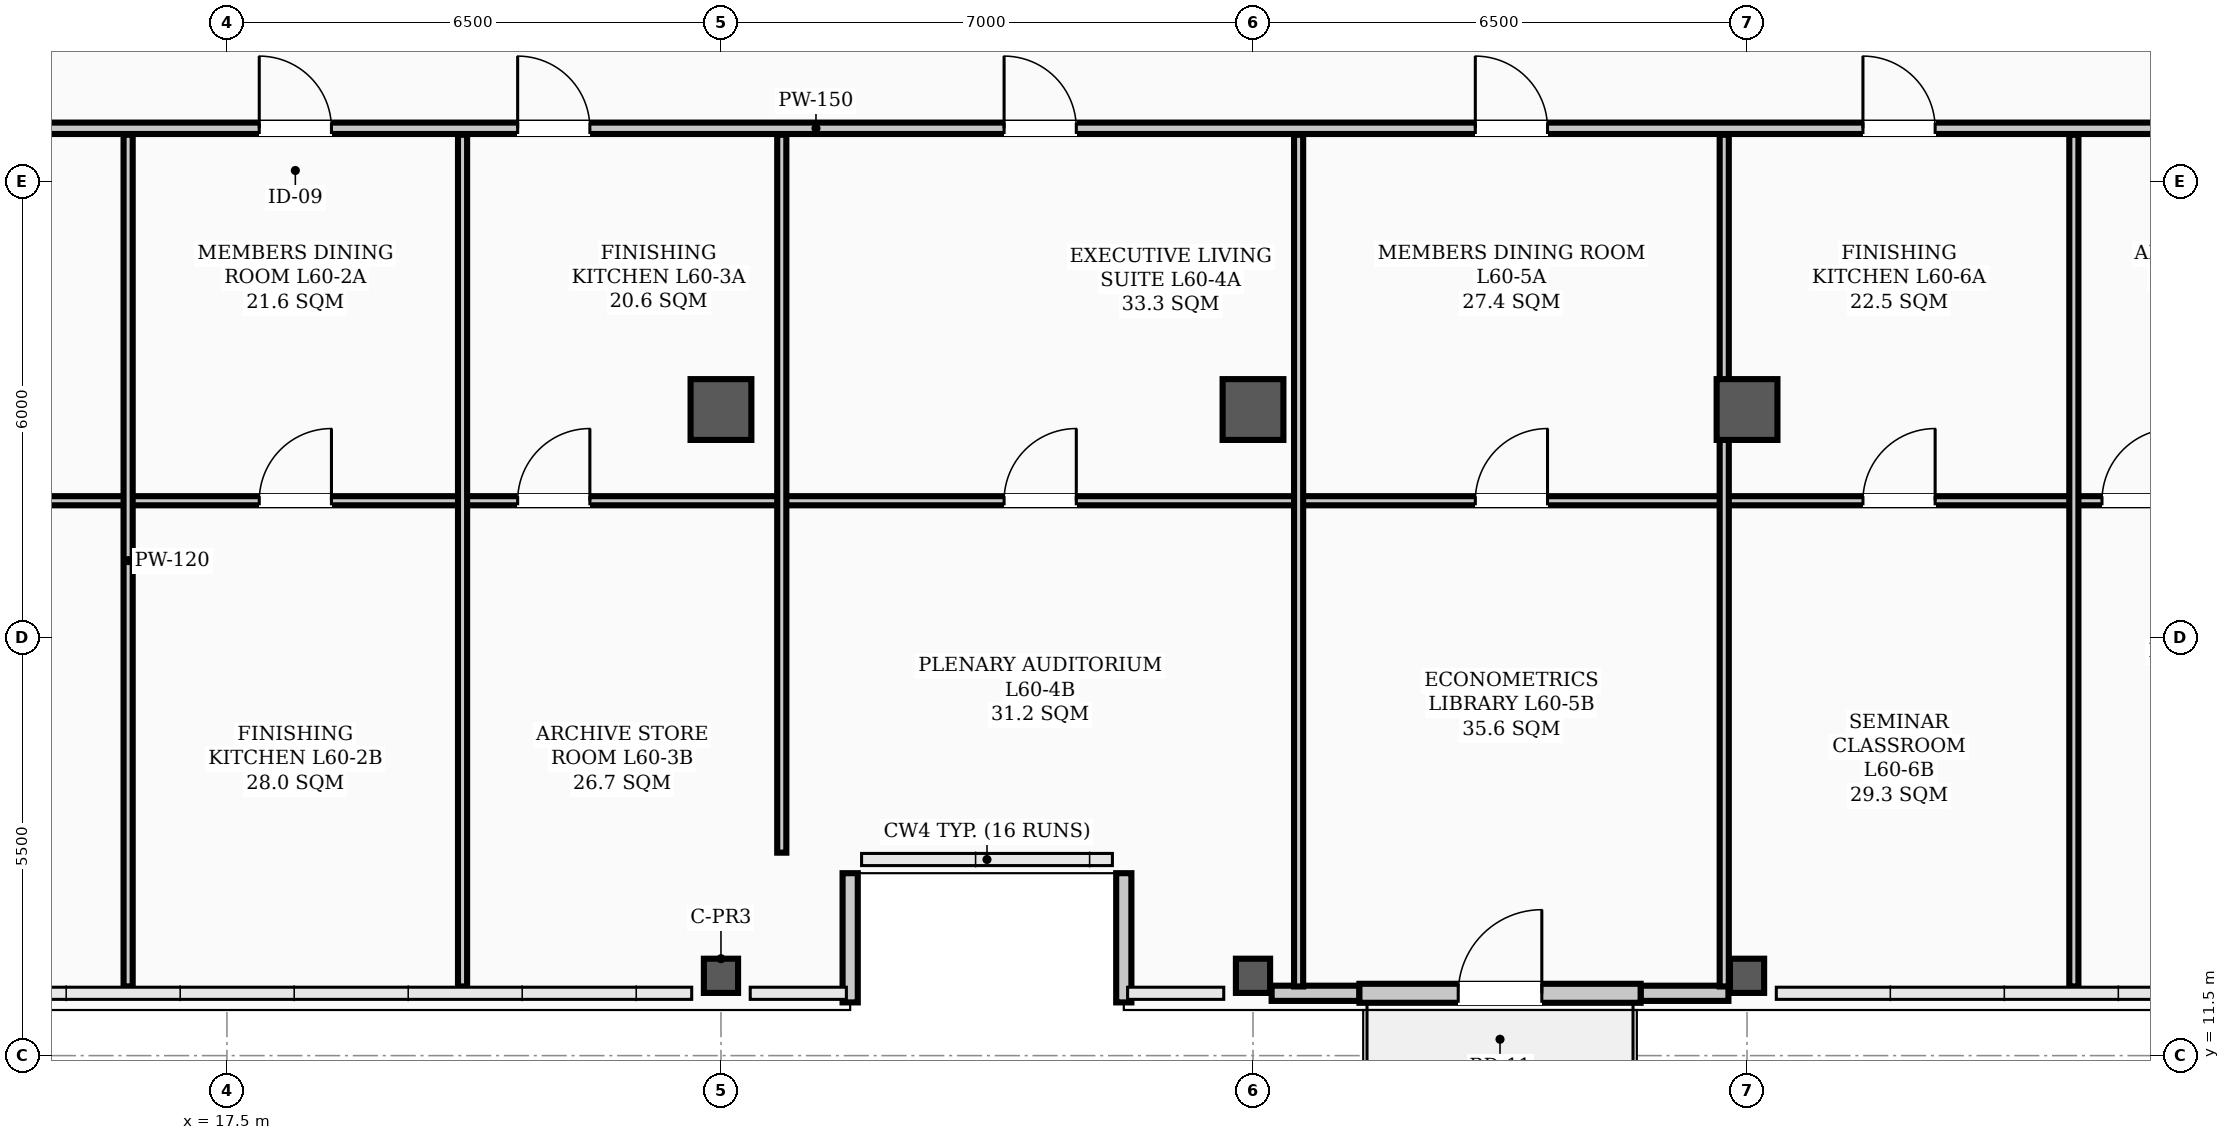
"""IFC4 building model, lengths in metres.
Left out: names, types, materials, properties, quantities, classifications, styles, units other than length and angle.
Written with IfcOpenShell. Run it as: python <this file> out.ifc"""

import sys

from ifc_helpers import new_model, si_unit, direction, frame, frame_2d, origin, origin_2d, place, context, subcontext, project, spatial, rectangle, hollow_rectangle, extrude, element, fill, save


model = new_model("IFC4")
c1 = context("Model", 3, precision=1e-05, world=origin(), true_north=direction((0.0, 1.0)))
c2 = subcontext(c1, "Body", "Model", "MODEL_VIEW")
j1 = project(units=[si_unit("LENGTHUNIT", "METRE"), si_unit("PLANEANGLEUNIT", "RADIAN")], contexts=[c1])
p1 = place(None, origin())
s1 = spatial("IfcSite", under=j1, at=p1, CompositionType="ELEMENT")
p2 = place(p1, origin())
s2 = spatial("IfcBuilding", under=s1, at=p2, CompositionType="ELEMENT")
p3 = place(p2, frame((0.0, 0.0, 242.3)))
s3 = spatial("IfcBuildingStorey", under=s2, at=p3, CompositionType="ELEMENT", Elevation=242.3)
for number, where, z_axis, x_axis in (
    (1, (24.0, 20.0, 0.0), (0.0, 0.0, 1.0), (1.0, 0.0, 0.0)),
    (2, (31.0, 20.0, 0.0), (0.0, 0.0, 1.0), (1.0, 0.0, 0.0)),
    (3, (37.5, 20.0, 0.0), (0.0, 0.0, 1.0), (1.0, 0.0, 0.0)),
):
    element("IfcColumn", number, at=place(p3, frame(where, z_axis=z_axis, x_axis=x_axis)), inside=s3, PredefinedType="COLUMN", context=c2, shape_type="SweptSolid", body=[
        extrude(hollow_rectangle(XDim=0.8, YDim=0.8, WallThickness=0.032, InnerFilletRadius=0.016, OuterFilletRadius=0.048, at=origin_2d()), origin(), (0.0, 0.0, 1.0), 3.9),
    ])
for number, where, z_axis, x_axis in (
    (4, (24.0, 12.55, 0.0), (0.0, 0.0, 1.0), (1.0, 0.0, 0.0)),
    (5, (31.0, 12.55, 0.0), (0.0, 0.0, 1.0), (1.0, 0.0, 0.0)),
    (6, (37.5, 12.55, 0.0), (0.0, 0.0, 1.0), (1.0, 0.0, 0.0)),
):
    element("IfcColumn", number, at=place(p3, frame(where, z_axis=z_axis, x_axis=x_axis)), inside=s3, PredefinedType="COLUMN", context=c2, shape_type="SweptSolid", body=[
        extrude(hollow_rectangle(XDim=0.45, YDim=0.45, WallThickness=0.022, InnerFilletRadius=0.022, OuterFilletRadius=0.044, at=origin_2d()), origin(), (0.0, 0.0, 1.0), 3.9),
    ])
for number, where, z_axis, x_axis in (
    (7, (31.245, 12.32, 0.0), (0.0, 0.0, 1.0), (1.0, 0.0, 0.0)),
    (8, (36.1, 12.32, 0.0), (0.0, 0.0, 1.0), (1.0, 0.0, 0.0)),
):
    element("IfcWall", number, at=place(p3, frame(where, z_axis=z_axis, x_axis=x_axis)), inside=s3, PredefinedType="PARAPET", context=c2, shape_type="SweptSolid", body=[
        extrude(rectangle(XDim=1.155, YDim=0.2, at=frame_2d((0.577, 0.0))), origin(), (0.0, 0.0, 1.0), 1.2),
    ])
for number, where, z_axis, x_axis in (
    (9, (25.7, 12.2, 0.0), (0.0, 0.0, 1.0), (0.0, 1.0, 0.0)),
    (10, (29.3, 13.9, 0.0), (0.0, 0.0, 1.0), (0.0, -1.0, 0.0)),
):
    element("IfcWall", number, at=place(p3, frame(where, z_axis=z_axis, x_axis=x_axis)), inside=s3, PredefinedType="PARAPET", context=c2, shape_type="SweptSolid", body=[
        extrude(rectangle(XDim=1.7, YDim=0.2, at=frame_2d((0.85, 0.0))), origin(), (0.0, 0.0, 1.0), 1.2),
    ])
p4 = place(p3, frame((32.4, 12.32, 0.0), z_axis=(0.0, 0.0, 1.0), x_axis=(1.0, 0.0, 0.0)))
e11 = element("IfcWall", 11, at=p4, inside=s3, PredefinedType="STANDARD", context=c2, shape_type="SweptSolid", body=[
    extrude(rectangle(XDim=3.7, YDim=0.25, at=frame_2d((1.85, 0.0))), origin(), (0.0, 0.0, 1.0), 3.18),
])
p5 = place(p4, frame((1.3, 0.0, 0.0)))
e12 = element("IfcOpeningElement", 12, at=p5, cuts=e11, PredefinedType="OPENING", context=c2, shape_type="SweptSolid", body=[
    extrude(rectangle(XDim=1.1, YDim=2.2, at=frame_2d((0.55, 1.1))), frame((0.0, 0.135, 0.0), z_axis=(0.0, -1.0, 0.0), x_axis=(1.0, 0.0, 0.0)), (0.0, 0.0, 1.0), 0.27),
])
p6 = place(p3, frame((4.81, 23.7, 0.0), z_axis=(0.0, 0.0, 1.0), x_axis=(1.0, 0.0, 0.0)))
e13 = element("IfcWall", 13, at=p6, inside=s3, PredefinedType="PARTITIONING", context=c2, shape_type="SweptSolid", body=[
    extrude(rectangle(XDim=40.88, YDim=0.15, at=frame_2d((20.44, 0.0))), origin(), (0.0, 0.0, 1.0), 3.2),
])
p7 = place(p6, frame((5.865, 0.0, 0.0)))
e14 = element("IfcOpeningElement", 14, at=p7, cuts=e13, PredefinedType="OPENING", context=c2, shape_type="SweptSolid", body=[
    extrude(rectangle(XDim=0.95, YDim=2.08, at=frame_2d((0.475, 1.04))), frame((0.0, 0.085, 0.0), z_axis=(0.0, -1.0, 0.0), x_axis=(1.0, 0.0, 0.0)), (0.0, 0.0, 1.0), 0.17),
])
p8 = place(p6, frame((13.115, 0.0, 0.0)))
e15 = element("IfcOpeningElement", 15, at=p8, cuts=e13, PredefinedType="OPENING", context=c2, shape_type="SweptSolid", body=[
    extrude(rectangle(XDim=0.95, YDim=2.08, at=frame_2d((0.475, 1.04))), frame((0.0, 0.085, 0.0), z_axis=(0.0, -1.0, 0.0), x_axis=(1.0, 0.0, 0.0)), (0.0, 0.0, 1.0), 0.17),
])
p9 = place(p6, frame((16.515, 0.0, 0.0)))
e16 = element("IfcOpeningElement", 16, at=p9, cuts=e13, PredefinedType="OPENING", context=c2, shape_type="SweptSolid", body=[
    extrude(rectangle(XDim=0.95, YDim=2.08, at=frame_2d((0.475, 1.04))), frame((0.0, 0.085, 0.0), z_axis=(0.0, -1.0, 0.0), x_axis=(1.0, 0.0, 0.0)), (0.0, 0.0, 1.0), 0.17),
])
p10 = place(p6, frame((22.915, 0.0, 0.0)))
e17 = element("IfcOpeningElement", 17, at=p10, cuts=e13, PredefinedType="OPENING", context=c2, shape_type="SweptSolid", body=[
    extrude(rectangle(XDim=0.95, YDim=2.08, at=frame_2d((0.475, 1.04))), frame((0.0, 0.085, 0.0), z_axis=(0.0, -1.0, 0.0), x_axis=(1.0, 0.0, 0.0)), (0.0, 0.0, 1.0), 0.17),
])
p11 = place(p6, frame((29.115, 0.0, 0.0)))
e18 = element("IfcOpeningElement", 18, at=p11, cuts=e13, PredefinedType="OPENING", context=c2, shape_type="SweptSolid", body=[
    extrude(rectangle(XDim=0.95, YDim=2.08, at=frame_2d((0.475, 1.04))), frame((0.0, 0.085, 0.0), z_axis=(0.0, -1.0, 0.0), x_axis=(1.0, 0.0, 0.0)), (0.0, 0.0, 1.0), 0.17),
])
p12 = place(p6, frame((34.215, 0.0, 0.0)))
e19 = element("IfcOpeningElement", 19, at=p12, cuts=e13, PredefinedType="OPENING", context=c2, shape_type="SweptSolid", body=[
    extrude(rectangle(XDim=0.95, YDim=2.08, at=frame_2d((0.475, 1.04))), frame((0.0, 0.085, 0.0), z_axis=(0.0, -1.0, 0.0), x_axis=(1.0, 0.0, 0.0)), (0.0, 0.0, 1.0), 0.17),
])
p13 = place(p6, frame((38.46, 0.0, 0.0)))
e20 = element("IfcOpeningElement", 20, at=p13, cuts=e13, PredefinedType="OPENING", context=c2, shape_type="SweptSolid", body=[
    extrude(rectangle(XDim=0.95, YDim=2.08, at=frame_2d((0.475, 1.04))), frame((0.0, 0.085, 0.0), z_axis=(0.0, -1.0, 0.0), x_axis=(1.0, 0.0, 0.0)), (0.0, 0.0, 1.0), 0.17),
])
p14 = place(p3, frame((4.81, 18.8, 0.0), z_axis=(0.0, 0.0, 1.0), x_axis=(1.0, 0.0, 0.0)))
e21 = element("IfcWall", 21, at=p14, inside=s3, PredefinedType="PARTITIONING", context=c2, shape_type="SweptSolid", body=[
    extrude(rectangle(XDim=11.39, YDim=0.12, at=frame_2d((5.695, 0.0))), origin(), (0.0, 0.0, 1.0), 3.2),
])
p15 = place(p14, frame((5.22, 0.0, 0.0)))
e22 = element("IfcOpeningElement", 22, at=p15, cuts=e21, PredefinedType="OPENING", context=c2, shape_type="SweptSolid", body=[
    extrude(rectangle(XDim=0.95, YDim=2.08, at=frame_2d((0.475, 1.04))), frame((0.0, 0.07, 0.0), z_axis=(0.0, -1.0, 0.0), x_axis=(1.0, 0.0, 0.0)), (0.0, 0.0, 1.0), 0.14),
])
p16 = place(p3, frame((16.2, 18.8, 0.0), z_axis=(0.0, 0.0, 1.0), x_axis=(1.0, 0.0, 0.0)))
e23 = element("IfcWall", 23, at=p16, inside=s3, PredefinedType="PARTITIONING", context=c2, shape_type="SweptSolid", body=[
    extrude(rectangle(XDim=4.4, YDim=0.12, at=frame_2d((2.2, 0.0))), origin(), (0.0, 0.0, 1.0), 3.35),
])
p17 = place(p16, frame((1.725, 0.0, 0.0)))
e24 = element("IfcOpeningElement", 24, at=p17, cuts=e23, PredefinedType="OPENING", context=c2, shape_type="SweptSolid", body=[
    extrude(rectangle(XDim=0.95, YDim=2.08, at=frame_2d((0.475, 1.04))), frame((0.0, 0.07, 0.0), z_axis=(0.0, -1.0, 0.0), x_axis=(1.0, 0.0, 0.0)), (0.0, 0.0, 1.0), 0.14),
])
p18 = place(p3, frame((20.6, 18.8, 0.0), z_axis=(0.0, 0.0, 1.0), x_axis=(1.0, 0.0, 0.0)))
e25 = element("IfcWall", 25, at=p18, inside=s3, PredefinedType="PARTITIONING", context=c2, shape_type="SweptSolid", body=[
    extrude(rectangle(XDim=4.2, YDim=0.12, at=frame_2d((2.1, 0.0))), origin(), (0.0, 0.0, 1.0), 3.2),
])
p19 = place(p18, frame((0.725, 0.0, 0.0)))
e26 = element("IfcOpeningElement", 26, at=p19, cuts=e25, PredefinedType="OPENING", context=c2, shape_type="SweptSolid", body=[
    extrude(rectangle(XDim=0.95, YDim=2.08, at=frame_2d((0.475, 1.04))), frame((0.0, 0.07, 0.0), z_axis=(0.0, -1.0, 0.0), x_axis=(1.0, 0.0, 0.0)), (0.0, 0.0, 1.0), 0.14),
])
p20 = place(p3, frame((24.8, 18.8, 0.0), z_axis=(0.0, 0.0, 1.0), x_axis=(1.0, 0.0, 0.0)))
e27 = element("IfcWall", 27, at=p20, inside=s3, PredefinedType="PARTITIONING", context=c2, shape_type="SweptSolid", body=[
    extrude(rectangle(XDim=6.8, YDim=0.12, at=frame_2d((3.4, 0.0))), origin(), (0.0, 0.0, 1.0), 3.2),
])
p21 = place(p20, frame((2.925, 0.0, 0.0)))
e28 = element("IfcOpeningElement", 28, at=p21, cuts=e27, PredefinedType="OPENING", context=c2, shape_type="SweptSolid", body=[
    extrude(rectangle(XDim=0.95, YDim=2.08, at=frame_2d((0.475, 1.04))), frame((0.0, 0.07, 0.0), z_axis=(0.0, -1.0, 0.0), x_axis=(1.0, 0.0, 0.0)), (0.0, 0.0, 1.0), 0.14),
])
p22 = place(p3, frame((31.6, 18.8, 0.0), z_axis=(0.0, 0.0, 1.0), x_axis=(1.0, 0.0, 0.0)))
e29 = element("IfcWall", 29, at=p22, inside=s3, PredefinedType="PARTITIONING", context=c2, shape_type="SweptSolid", body=[
    extrude(rectangle(XDim=5.6, YDim=0.12, at=frame_2d((2.8, 0.0))), origin(), (0.0, 0.0, 1.0), 3.2),
])
p23 = place(p22, frame((2.325, 0.0, 0.0)))
e30 = element("IfcOpeningElement", 30, at=p23, cuts=e29, PredefinedType="OPENING", context=c2, shape_type="SweptSolid", body=[
    extrude(rectangle(XDim=0.95, YDim=2.08, at=frame_2d((0.475, 1.04))), frame((0.0, 0.07, 0.0), z_axis=(0.0, -1.0, 0.0), x_axis=(1.0, 0.0, 0.0)), (0.0, 0.0, 1.0), 0.14),
])
p24 = place(p3, frame((37.2, 18.8, 0.0), z_axis=(0.0, 0.0, 1.0), x_axis=(1.0, 0.0, 0.0)))
e31 = element("IfcWall", 31, at=p24, inside=s3, PredefinedType="PARTITIONING", context=c2, shape_type="SweptSolid", body=[
    extrude(rectangle(XDim=4.6, YDim=0.12, at=frame_2d((2.3, 0.0))), origin(), (0.0, 0.0, 1.0), 3.2),
])
p25 = place(p24, frame((1.825, 0.0, 0.0)))
e32 = element("IfcOpeningElement", 32, at=p25, cuts=e31, PredefinedType="OPENING", context=c2, shape_type="SweptSolid", body=[
    extrude(rectangle(XDim=0.95, YDim=2.08, at=frame_2d((0.475, 1.04))), frame((0.0, 0.07, 0.0), z_axis=(0.0, -1.0, 0.0), x_axis=(1.0, 0.0, 0.0)), (0.0, 0.0, 1.0), 0.14),
])
p26 = place(p3, frame((41.8, 18.8, 0.0), z_axis=(0.0, 0.0, 1.0), x_axis=(1.0, 0.0, 0.0)))
e33 = element("IfcWall", 33, at=p26, inside=s3, PredefinedType="PARTITIONING", context=c2, shape_type="SweptSolid", body=[
    extrude(rectangle(XDim=3.89, YDim=0.12, at=frame_2d((1.945, 0.0))), origin(), (0.0, 0.0, 1.0), 3.72),
])
p27 = place(p26, frame((0.37, 0.0, 0.0)))
e34 = element("IfcOpeningElement", 34, at=p27, cuts=e33, PredefinedType="OPENING", context=c2, shape_type="SweptSolid", body=[
    extrude(rectangle(XDim=0.95, YDim=2.08, at=frame_2d((0.475, 1.04))), frame((0.0, 0.07, 0.0), z_axis=(0.0, -1.0, 0.0), x_axis=(1.0, 0.0, 0.0)), (0.0, 0.0, 1.0), 0.14),
])
for number, where, z_axis, x_axis in (
    (35, (16.2, 12.41, 0.0), (0.0, 0.0, 1.0), (0.0, 1.0, 0.0)),
    (36, (20.6, 12.41, 0.0), (0.0, 0.0, 1.0), (0.0, 1.0, 0.0)),
):
    element("IfcWall", number, at=place(p3, frame(where, z_axis=z_axis, x_axis=x_axis)), inside=s3, PredefinedType="PARTITIONING", context=c2, shape_type="SweptSolid", body=[
        extrude(rectangle(XDim=11.205, YDim=0.12, at=frame_2d((5.603, 0.0))), origin(), (0.0, 0.0, 1.0), 3.1),
    ])
p28 = place(p3, frame((24.8, 14.17, 0.0), z_axis=(0.0, 0.0, 1.0), x_axis=(0.0, 1.0, 0.0)))
e37 = element("IfcWall", 37, at=p28, inside=s3, PredefinedType="PARTITIONING", context=c2, shape_type="SweptSolid", body=[
    extrude(rectangle(XDim=9.445, YDim=0.12, at=frame_2d((4.723, 0.0))), origin(), (0.0, 0.0, 1.0), 3.1),
])
for number, where, z_axis, x_axis in (
    (38, (31.6, 12.41, 0.0), (0.0, 0.0, 1.0), (0.0, 1.0, 0.0)),
    (39, (37.2, 12.41, 0.0), (0.0, 0.0, 1.0), (0.0, 1.0, 0.0)),
):
    element("IfcWall", number, at=place(p3, frame(where, z_axis=z_axis, x_axis=x_axis)), inside=s3, PredefinedType="PARTITIONING", context=c2, shape_type="SweptSolid", body=[
        extrude(rectangle(XDim=11.205, YDim=0.12, at=frame_2d((5.603, 0.0))), origin(), (0.0, 0.0, 1.0), 3.1),
    ])
p29 = place(p3, frame((41.8, 12.41, 0.0), z_axis=(0.0, 0.0, 1.0), x_axis=(0.0, 1.0, 0.0)))
e40 = element("IfcWall", 40, at=p29, inside=s3, PredefinedType="PARTITIONING", context=c2, shape_type="SweptSolid", body=[
    extrude(rectangle(XDim=11.205, YDim=0.12, at=frame_2d((5.603, 0.0))), origin(), (0.0, 0.0, 1.0), 3.72),
])
p30 = place(p5, origin())
e41 = element("IfcDoor", 41, at=p30, inside=s3, OperationType="SINGLE_SWING_RIGHT", PredefinedType="DOOR", context=c2, shape_type="SweptSolid", body=[
    extrude(rectangle(XDim=1.1, YDim=2.2, at=frame_2d((0.55, 1.1))), frame((0.0, 0.025, 0.0), z_axis=(0.0, -1.0, 0.0), x_axis=(1.0, 0.0, 0.0)), (0.0, 0.0, 1.0), 0.05),
])
fill(e12, e41)
p31 = place(p17, origin())
e42 = element("IfcDoor", 42, at=p31, inside=s3, OperationType="SINGLE_SWING_RIGHT", PredefinedType="DOOR", context=c2, shape_type="SweptSolid", body=[
    extrude(rectangle(XDim=0.95, YDim=2.08, at=frame_2d((0.475, 1.04))), frame((0.0, 0.025, 0.0), z_axis=(0.0, -1.0, 0.0), x_axis=(1.0, 0.0, 0.0)), (0.0, 0.0, 1.0), 0.05),
])
fill(e24, e42)
p32 = place(p8, origin())
e43 = element("IfcDoor", 43, at=p32, inside=s3, OperationType="SINGLE_SWING_LEFT", PredefinedType="DOOR", context=c2, shape_type="SweptSolid", body=[
    extrude(rectangle(XDim=0.95, YDim=2.08, at=frame_2d((0.475, 1.04))), frame((0.0, 0.025, 0.0), z_axis=(0.0, -1.0, 0.0), x_axis=(1.0, 0.0, 0.0)), (0.0, 0.0, 1.0), 0.05),
])
fill(e15, e43)
p33 = place(p19, origin())
e44 = element("IfcDoor", 44, at=p33, inside=s3, OperationType="SINGLE_SWING_RIGHT", PredefinedType="DOOR", context=c2, shape_type="SweptSolid", body=[
    extrude(rectangle(XDim=0.95, YDim=2.08, at=frame_2d((0.475, 1.04))), frame((0.0, 0.025, 0.0), z_axis=(0.0, -1.0, 0.0), x_axis=(1.0, 0.0, 0.0)), (0.0, 0.0, 1.0), 0.05),
])
fill(e26, e44)
p34 = place(p9, origin())
e45 = element("IfcDoor", 45, at=p34, inside=s3, OperationType="SINGLE_SWING_LEFT", PredefinedType="DOOR", context=c2, shape_type="SweptSolid", body=[
    extrude(rectangle(XDim=0.95, YDim=2.08, at=frame_2d((0.475, 1.04))), frame((0.0, 0.025, 0.0), z_axis=(0.0, -1.0, 0.0), x_axis=(1.0, 0.0, 0.0)), (0.0, 0.0, 1.0), 0.05),
])
fill(e16, e45)
p35 = place(p21, origin())
e46 = element("IfcDoor", 46, at=p35, inside=s3, OperationType="SINGLE_SWING_RIGHT", PredefinedType="DOOR", context=c2, shape_type="SweptSolid", body=[
    extrude(rectangle(XDim=0.95, YDim=2.08, at=frame_2d((0.475, 1.04))), frame((0.0, 0.025, 0.0), z_axis=(0.0, -1.0, 0.0), x_axis=(1.0, 0.0, 0.0)), (0.0, 0.0, 1.0), 0.05),
])
fill(e28, e46)
p36 = place(p10, origin())
e47 = element("IfcDoor", 47, at=p36, inside=s3, OperationType="SINGLE_SWING_LEFT", PredefinedType="DOOR", context=c2, shape_type="SweptSolid", body=[
    extrude(rectangle(XDim=0.95, YDim=2.08, at=frame_2d((0.475, 1.04))), frame((0.0, 0.025, 0.0), z_axis=(0.0, -1.0, 0.0), x_axis=(1.0, 0.0, 0.0)), (0.0, 0.0, 1.0), 0.05),
])
fill(e17, e47)
p37 = place(p23, origin())
e48 = element("IfcDoor", 48, at=p37, inside=s3, OperationType="SINGLE_SWING_RIGHT", PredefinedType="DOOR", context=c2, shape_type="SweptSolid", body=[
    extrude(rectangle(XDim=0.95, YDim=2.08, at=frame_2d((0.475, 1.04))), frame((0.0, 0.025, 0.0), z_axis=(0.0, -1.0, 0.0), x_axis=(1.0, 0.0, 0.0)), (0.0, 0.0, 1.0), 0.05),
])
fill(e30, e48)
p38 = place(p11, origin())
e49 = element("IfcDoor", 49, at=p38, inside=s3, OperationType="SINGLE_SWING_LEFT", PredefinedType="DOOR", context=c2, shape_type="SweptSolid", body=[
    extrude(rectangle(XDim=0.95, YDim=2.08, at=frame_2d((0.475, 1.04))), frame((0.0, 0.025, 0.0), z_axis=(0.0, -1.0, 0.0), x_axis=(1.0, 0.0, 0.0)), (0.0, 0.0, 1.0), 0.05),
])
fill(e18, e49)
p39 = place(p25, origin())
e50 = element("IfcDoor", 50, at=p39, inside=s3, OperationType="SINGLE_SWING_RIGHT", PredefinedType="DOOR", context=c2, shape_type="SweptSolid", body=[
    extrude(rectangle(XDim=0.95, YDim=2.08, at=frame_2d((0.475, 1.04))), frame((0.0, 0.025, 0.0), z_axis=(0.0, -1.0, 0.0), x_axis=(1.0, 0.0, 0.0)), (0.0, 0.0, 1.0), 0.05),
])
fill(e32, e50)
p40 = place(p12, origin())
e51 = element("IfcDoor", 51, at=p40, inside=s3, OperationType="SINGLE_SWING_LEFT", PredefinedType="DOOR", context=c2, shape_type="SweptSolid", body=[
    extrude(rectangle(XDim=0.95, YDim=2.08, at=frame_2d((0.475, 1.04))), frame((0.0, 0.025, 0.0), z_axis=(0.0, -1.0, 0.0), x_axis=(1.0, 0.0, 0.0)), (0.0, 0.0, 1.0), 0.05),
])
fill(e19, e51)
p41 = place(p27, origin())
e52 = element("IfcDoor", 52, at=p41, inside=s3, OperationType="SINGLE_SWING_RIGHT", PredefinedType="DOOR", context=c2, shape_type="SweptSolid", body=[
    extrude(rectangle(XDim=0.95, YDim=2.08, at=frame_2d((0.475, 1.04))), frame((0.0, 0.025, 0.0), z_axis=(0.0, -1.0, 0.0), x_axis=(1.0, 0.0, 0.0)), (0.0, 0.0, 1.0), 0.05),
])
fill(e34, e52)
save(model, sys.argv[1])
